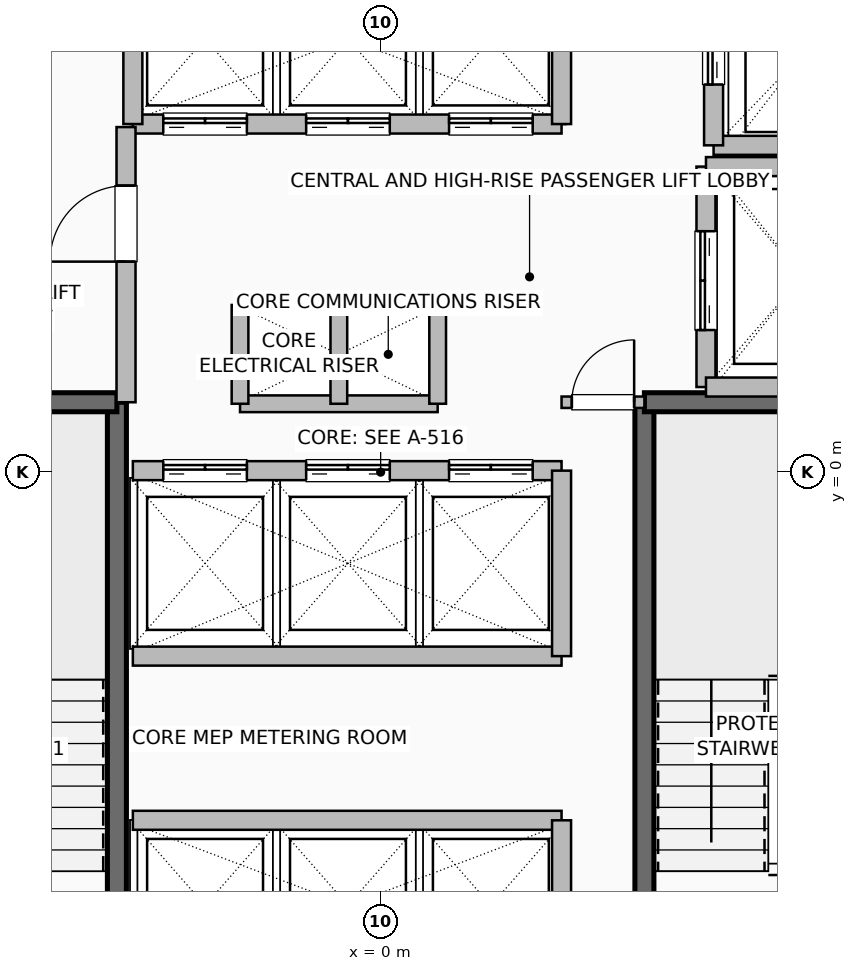
"""IFC4 building model, lengths in metres.
Left out: names, types, materials, properties, quantities, classifications, styles, units other than length and angle.
Written with IfcOpenShell. Run it as: python <this file> out.ifc"""

import sys

from ifc_helpers import new_model, si_unit, direction, frame, frame_2d, origin, place, context, subcontext, project, spatial, rectangle, extrude, element, fill, save


model = new_model("IFC4")
c1 = context("Model", 3, precision=1e-05, world=origin(), true_north=direction((0.0, 1.0)))
c2 = subcontext(c1, "Body", "Model", "MODEL_VIEW")
j1 = project(units=[si_unit("LENGTHUNIT", "METRE"), si_unit("PLANEANGLEUNIT", "RADIAN")], contexts=[c1])
p1 = place(None, origin())
s1 = spatial("IfcSite", under=j1, at=p1, CompositionType="ELEMENT")
p2 = place(p1, origin())
s2 = spatial("IfcBuilding", under=s1, at=p2, CompositionType="ELEMENT")
p3 = place(p2, frame((0.0, 0.0, 58.5)))
s3 = spatial("IfcBuildingStorey", under=s2, at=p3, CompositionType="ELEMENT", Elevation=58.5)
p4 = place(p3, frame((-3.47, -6.8, 0.0), z_axis=(0.0, 0.0, 1.0), x_axis=(0.0, 1.0, 0.0)))
e1 = element("IfcWall", 1, at=p4, inside=s3, PredefinedType="SHEAR", context=c2, shape_type="SweptSolid", body=[
    extrude(rectangle(XDim=7.72, YDim=0.25, at=frame_2d((3.86, 0.0))), origin(), (0.0, 0.0, 1.0), 3.25),
])
p5 = place(p3, frame((-6.8, 0.92, 0.0), z_axis=(0.0, 0.0, 1.0), x_axis=(1.0, 0.0, 0.0)))
e2 = element("IfcWall", 2, at=p5, inside=s3, PredefinedType="SHEAR", context=c2, shape_type="SweptSolid", body=[
    extrude(rectangle(XDim=3.33, YDim=0.25, at=frame_2d((1.665, 0.0))), origin(), (0.0, 0.0, 1.0), 3.25),
])
p6 = place(p3, frame((3.47, -6.8, 0.0), z_axis=(0.0, 0.0, 1.0), x_axis=(0.0, 1.0, 0.0)))
e3 = element("IfcWall", 3, at=p6, inside=s3, PredefinedType="SHEAR", context=c2, shape_type="SweptSolid", body=[
    extrude(rectangle(XDim=7.72, YDim=0.25, at=frame_2d((3.86, 0.0))), origin(), (0.0, 0.0, 1.0), 3.25),
])
p7 = place(p3, frame((3.47, 0.92, 0.0), z_axis=(0.0, 0.0, 1.0), x_axis=(1.0, 0.0, 0.0)))
e4 = element("IfcWall", 4, at=p7, inside=s3, PredefinedType="SHEAR", context=c2, shape_type="SweptSolid", body=[
    extrude(rectangle(XDim=3.33, YDim=0.25, at=frame_2d((1.665, 0.0))), origin(), (0.0, 0.0, 1.0), 3.25),
])
for number, where, z_axis, x_axis in (
    (5, (-1.85, 2.2, 0.0), (0.0, 0.0, 1.0), (1.0, 0.0, 0.0)),
    (6, (-1.85, 0.9, 0.0), (0.0, 0.0, 1.0), (1.0, 0.0, 0.0)),
):
    element("IfcWall", number, at=place(p3, frame(where, z_axis=z_axis, x_axis=x_axis)), inside=s3, PredefinedType="PARTITIONING", context=c2, shape_type="SweptSolid", body=[
        extrude(rectangle(XDim=2.6, YDim=0.22, at=frame_2d((1.3, 0.0))), origin(), (0.0, 0.0, 1.0), 3.25),
    ])
for number, where, z_axis, x_axis in (
    (7, (-0.55, 0.9, 0.0), (0.0, 0.0, 1.0), (0.0, 1.0, 0.0)),
    (8, (0.75, 0.9, 0.0), (0.0, 0.0, 1.0), (0.0, 1.0, 0.0)),
    (9, (-1.85, 0.9, 0.0), (0.0, 0.0, 1.0), (0.0, 1.0, 0.0)),
):
    element("IfcWall", number, at=place(p3, frame(where, z_axis=z_axis, x_axis=x_axis)), inside=s3, PredefinedType="PARTITIONING", context=c2, shape_type="SweptSolid", body=[
        extrude(rectangle(XDim=1.3, YDim=0.22, at=frame_2d((0.65, 0.0))), origin(), (0.0, 0.0, 1.0), 3.25),
    ])
p8 = place(p3, frame((-3.26, -4.58, 0.0), z_axis=(0.0, 0.0, 1.0), x_axis=(1.0, 0.0, 0.0)))
e10 = element("IfcWall", 10, at=p8, inside=s3, PredefinedType="SHEAR", context=c2, shape_type="SweptSolid", body=[
    extrude(rectangle(XDim=5.64, YDim=0.25, at=frame_2d((2.82, 0.0))), origin(), (0.0, 0.0, 1.0), 3.25),
])
p9 = place(p3, frame((2.38, -6.8, 0.0), z_axis=(0.0, 0.0, 1.0), x_axis=(0.0, 1.0, 0.0)))
e11 = element("IfcWall", 11, at=p9, inside=s3, PredefinedType="SHEAR", context=c2, shape_type="SweptSolid", body=[
    extrude(rectangle(XDim=2.22, YDim=0.25, at=frame_2d((1.11, 0.0))), origin(), (0.0, 0.0, 1.0), 3.25),
])
p10 = place(p3, frame((-3.26, 0.02, 0.0), z_axis=(0.0, 0.0, 1.0), x_axis=(1.0, 0.0, 0.0)))
e12 = element("IfcWall", 12, at=p10, inside=s3, PredefinedType="SHEAR", context=c2, shape_type="SweptSolid", body=[
    extrude(rectangle(XDim=5.64, YDim=0.25, at=frame_2d((2.82, 0.0))), origin(), (0.0, 0.0, 1.0), 3.25),
])
p11 = place(p10, frame((0.4, 0.0, 0.0)))
e13 = element("IfcOpeningElement", 13, at=p11, cuts=e12, PredefinedType="OPENING", context=c2, shape_type="SweptSolid", body=[
    extrude(rectangle(XDim=1.1, YDim=2.2, at=frame_2d((0.55, 1.1))), frame((0.0, 0.135, 0.0), z_axis=(0.0, -1.0, 0.0), x_axis=(1.0, 0.0, 0.0)), (0.0, 0.0, 1.0), 0.27),
])
p12 = place(p10, frame((2.28, 0.0, 0.0)))
e14 = element("IfcOpeningElement", 14, at=p12, cuts=e12, PredefinedType="OPENING", context=c2, shape_type="SweptSolid", body=[
    extrude(rectangle(XDim=1.1, YDim=2.2, at=frame_2d((0.55, 1.1))), frame((0.0, 0.135, 0.0), z_axis=(0.0, -1.0, 0.0), x_axis=(1.0, 0.0, 0.0)), (0.0, 0.0, 1.0), 0.27),
])
p13 = place(p10, frame((4.16, 0.0, 0.0)))
e15 = element("IfcOpeningElement", 15, at=p13, cuts=e12, PredefinedType="OPENING", context=c2, shape_type="SweptSolid", body=[
    extrude(rectangle(XDim=1.1, YDim=2.2, at=frame_2d((0.55, 1.1))), frame((0.0, 0.135, 0.0), z_axis=(0.0, -1.0, 0.0), x_axis=(1.0, 0.0, 0.0)), (0.0, 0.0, 1.0), 0.27),
])
p14 = place(p3, frame((-3.26, -2.42, 0.0), z_axis=(0.0, 0.0, 1.0), x_axis=(1.0, 0.0, 0.0)))
e16 = element("IfcWall", 16, at=p14, inside=s3, PredefinedType="SHEAR", context=c2, shape_type="SweptSolid", body=[
    extrude(rectangle(XDim=5.64, YDim=0.25, at=frame_2d((2.82, 0.0))), origin(), (0.0, 0.0, 1.0), 3.25),
])
p15 = place(p3, frame((2.38, -2.42, 0.0), z_axis=(0.0, 0.0, 1.0), x_axis=(0.0, 1.0, 0.0)))
e17 = element("IfcWall", 17, at=p15, inside=s3, PredefinedType="SHEAR", context=c2, shape_type="SweptSolid", body=[
    extrude(rectangle(XDim=2.44, YDim=0.25, at=frame_2d((1.22, 0.0))), origin(), (0.0, 0.0, 1.0), 3.25),
])
p16 = place(p3, frame((-3.26, 4.58, 0.0), z_axis=(0.0, 0.0, 1.0), x_axis=(1.0, 0.0, 0.0)))
e18 = element("IfcWall", 18, at=p16, inside=s3, PredefinedType="SHEAR", context=c2, shape_type="SweptSolid", body=[
    extrude(rectangle(XDim=5.64, YDim=0.25, at=frame_2d((2.82, 0.0))), origin(), (0.0, 0.0, 1.0), 3.25),
])
p17 = place(p16, frame((0.4, 0.0, 0.0)))
e19 = element("IfcOpeningElement", 19, at=p17, cuts=e18, PredefinedType="OPENING", context=c2, shape_type="SweptSolid", body=[
    extrude(rectangle(XDim=1.1, YDim=2.2, at=frame_2d((0.55, 1.1))), frame((0.0, 0.135, 0.0), z_axis=(0.0, -1.0, 0.0), x_axis=(1.0, 0.0, 0.0)), (0.0, 0.0, 1.0), 0.27),
])
p18 = place(p16, frame((2.28, 0.0, 0.0)))
e20 = element("IfcOpeningElement", 20, at=p18, cuts=e18, PredefinedType="OPENING", context=c2, shape_type="SweptSolid", body=[
    extrude(rectangle(XDim=1.1, YDim=2.2, at=frame_2d((0.55, 1.1))), frame((0.0, 0.135, 0.0), z_axis=(0.0, -1.0, 0.0), x_axis=(1.0, 0.0, 0.0)), (0.0, 0.0, 1.0), 0.27),
])
p19 = place(p16, frame((4.16, 0.0, 0.0)))
e21 = element("IfcOpeningElement", 21, at=p19, cuts=e18, PredefinedType="OPENING", context=c2, shape_type="SweptSolid", body=[
    extrude(rectangle(XDim=1.1, YDim=2.2, at=frame_2d((0.55, 1.1))), frame((0.0, 0.135, 0.0), z_axis=(0.0, -1.0, 0.0), x_axis=(1.0, 0.0, 0.0)), (0.0, 0.0, 1.0), 0.27),
])
for number, where, z_axis, x_axis in (
    (22, (-3.26, 4.58, 0.0), (0.0, 0.0, 1.0), (0.0, 1.0, 0.0)),
    (23, (2.38, 4.58, 0.0), (0.0, 0.0, 1.0), (0.0, 1.0, 0.0)),
):
    element("IfcWall", number, at=place(p3, frame(where, z_axis=z_axis, x_axis=x_axis)), inside=s3, PredefinedType="SHEAR", context=c2, shape_type="SweptSolid", body=[
        extrude(rectangle(XDim=2.22, YDim=0.25, at=frame_2d((1.11, 0.0))), origin(), (0.0, 0.0, 1.0), 3.25),
    ])
p20 = place(p3, frame((4.38, 4.3, 0.0), z_axis=(0.0, 0.0, 1.0), x_axis=(1.0, 0.0, 0.0)))
e24 = element("IfcWall", 24, at=p20, inside=s3, PredefinedType="SHEAR", context=c2, shape_type="SweptSolid", body=[
    extrude(rectangle(XDim=2.42, YDim=0.25, at=frame_2d((1.21, 0.0))), origin(), (0.0, 0.0, 1.0), 3.25),
])
p21 = place(p3, frame((4.38, 4.3, 0.0), z_axis=(0.0, 0.0, 1.0), x_axis=(0.0, 1.0, 0.0)))
e25 = element("IfcWall", 25, at=p21, inside=s3, PredefinedType="SHEAR", context=c2, shape_type="SweptSolid", body=[
    extrude(rectangle(XDim=2.5, YDim=0.25, at=frame_2d((1.25, 0.0))), origin(), (0.0, 0.0, 1.0), 3.25),
])
p22 = place(p21, frame((0.8, 0.0, 0.0)))
e26 = element("IfcOpeningElement", 26, at=p22, cuts=e25, PredefinedType="OPENING", context=c2, shape_type="SweptSolid", body=[
    extrude(rectangle(XDim=1.2, YDim=2.2, at=frame_2d((0.6, 1.1))), frame((0.0, 0.135, 0.0), z_axis=(0.0, -1.0, 0.0), x_axis=(1.0, 0.0, 0.0)), (0.0, 0.0, 1.0), 0.27),
])
p23 = place(p3, frame((4.28, 1.12, 0.0), z_axis=(0.0, 0.0, 1.0), x_axis=(0.0, 1.0, 0.0)))
e27 = element("IfcWall", 27, at=p23, inside=s3, PredefinedType="SHEAR", context=c2, shape_type="SweptSolid", body=[
    extrude(rectangle(XDim=2.9, YDim=0.25, at=frame_2d((1.45, 0.0))), origin(), (0.0, 0.0, 1.0), 3.25),
])
p24 = place(p23, frame((0.75, 0.0, 0.0)))
e28 = element("IfcOpeningElement", 28, at=p24, cuts=e27, PredefinedType="OPENING", context=c2, shape_type="SweptSolid", body=[
    extrude(rectangle(XDim=1.3, YDim=2.3, at=frame_2d((0.65, 1.15))), frame((0.0, 0.135, 0.0), z_axis=(0.0, -1.0, 0.0), x_axis=(1.0, 0.0, 0.0)), (0.0, 0.0, 1.0), 0.27),
])
for number, where, z_axis, x_axis in (
    (29, (4.28, 1.12, 0.0), (0.0, 0.0, 1.0), (1.0, 0.0, 0.0)),
    (30, (4.28, 4.02, 0.0), (0.0, 0.0, 1.0), (1.0, 0.0, 0.0)),
):
    element("IfcWall", number, at=place(p3, frame(where, z_axis=z_axis, x_axis=x_axis)), inside=s3, PredefinedType="SHEAR", context=c2, shape_type="SweptSolid", body=[
        extrude(rectangle(XDim=2.52, YDim=0.25, at=frame_2d((1.26, 0.0))), origin(), (0.0, 0.0, 1.0), 3.25),
    ])
p25 = place(p3, frame((-3.35, 0.92, 0.0), z_axis=(0.0, 0.0, 1.0), x_axis=(0.0, 1.0, 0.0)))
e31 = element("IfcWall", 31, at=p25, inside=s3, PredefinedType="SHEAR", context=c2, shape_type="SweptSolid", body=[
    extrude(rectangle(XDim=3.62, YDim=0.25, at=frame_2d((1.81, 0.0))), origin(), (0.0, 0.0, 1.0), 3.25),
])
p26 = place(p25, frame((1.85, 0.0, 0.0)))
e32 = element("IfcOpeningElement", 32, at=p26, cuts=e31, PredefinedType="OPENING", context=c2, shape_type="SweptSolid", body=[
    extrude(rectangle(XDim=1.0, YDim=2.08, at=frame_2d((0.5, 1.04))), frame((0.0, 0.135, 0.0), z_axis=(0.0, -1.0, 0.0), x_axis=(1.0, 0.0, 0.0)), (0.0, 0.0, 1.0), 0.27),
])
p27 = place(p3, frame((2.38, 0.92, 0.0), z_axis=(0.0, 0.0, 1.0), x_axis=(1.0, 0.0, 0.0)))
e33 = element("IfcWall", 33, at=p27, inside=s3, PredefinedType="PARTITIONING", context=c2, shape_type="SweptSolid", body=[
    extrude(rectangle(XDim=1.09, YDim=0.15, at=frame_2d((0.545, 0.0))), origin(), (0.0, 0.0, 1.0), 3.25),
])
p28 = place(p27, frame((0.135, 0.0, 0.0)))
e34 = element("IfcOpeningElement", 34, at=p28, cuts=e33, PredefinedType="OPENING", context=c2, shape_type="SweptSolid", body=[
    extrude(rectangle(XDim=0.82, YDim=2.05, at=frame_2d((0.41, 1.025))), frame((0.0, 0.085, 0.0), z_axis=(0.0, -1.0, 0.0), x_axis=(1.0, 0.0, 0.0)), (0.0, 0.0, 1.0), 0.17),
])
p29 = place(p11, origin())
e35 = element("IfcDoor", 35, at=p29, inside=s3, OperationType="DOUBLE_DOOR_SLIDING", PredefinedType="DOOR", context=c2, shape_type="SweptSolid", body=[
    extrude(rectangle(XDim=1.1, YDim=2.2, at=frame_2d((0.55, 1.1))), frame((0.0, 0.025, 0.0), z_axis=(0.0, -1.0, 0.0), x_axis=(1.0, 0.0, 0.0)), (0.0, 0.0, 1.0), 0.05),
])
fill(e13, e35)
p30 = place(p12, origin())
e36 = element("IfcDoor", 36, at=p30, inside=s3, OperationType="DOUBLE_DOOR_SLIDING", PredefinedType="DOOR", context=c2, shape_type="SweptSolid", body=[
    extrude(rectangle(XDim=1.1, YDim=2.2, at=frame_2d((0.55, 1.1))), frame((0.0, 0.025, 0.0), z_axis=(0.0, -1.0, 0.0), x_axis=(1.0, 0.0, 0.0)), (0.0, 0.0, 1.0), 0.05),
])
fill(e14, e36)
p31 = place(p13, origin())
e37 = element("IfcDoor", 37, at=p31, inside=s3, OperationType="DOUBLE_DOOR_SLIDING", PredefinedType="DOOR", context=c2, shape_type="SweptSolid", body=[
    extrude(rectangle(XDim=1.1, YDim=2.2, at=frame_2d((0.55, 1.1))), frame((0.0, 0.025, 0.0), z_axis=(0.0, -1.0, 0.0), x_axis=(1.0, 0.0, 0.0)), (0.0, 0.0, 1.0), 0.05),
])
fill(e15, e37)
p32 = place(p17, origin())
e38 = element("IfcDoor", 38, at=p32, inside=s3, OperationType="DOUBLE_DOOR_SLIDING", PredefinedType="DOOR", context=c2, shape_type="SweptSolid", body=[
    extrude(rectangle(XDim=1.1, YDim=2.2, at=frame_2d((0.55, 1.1))), frame((0.0, 0.025, 0.0), z_axis=(0.0, -1.0, 0.0), x_axis=(1.0, 0.0, 0.0)), (0.0, 0.0, 1.0), 0.05),
])
fill(e19, e38)
p33 = place(p18, origin())
e39 = element("IfcDoor", 39, at=p33, inside=s3, OperationType="DOUBLE_DOOR_SLIDING", PredefinedType="DOOR", context=c2, shape_type="SweptSolid", body=[
    extrude(rectangle(XDim=1.1, YDim=2.2, at=frame_2d((0.55, 1.1))), frame((0.0, 0.025, 0.0), z_axis=(0.0, -1.0, 0.0), x_axis=(1.0, 0.0, 0.0)), (0.0, 0.0, 1.0), 0.05),
])
fill(e20, e39)
p34 = place(p19, origin())
e40 = element("IfcDoor", 40, at=p34, inside=s3, OperationType="DOUBLE_DOOR_SLIDING", PredefinedType="DOOR", context=c2, shape_type="SweptSolid", body=[
    extrude(rectangle(XDim=1.1, YDim=2.2, at=frame_2d((0.55, 1.1))), frame((0.0, 0.025, 0.0), z_axis=(0.0, -1.0, 0.0), x_axis=(1.0, 0.0, 0.0)), (0.0, 0.0, 1.0), 0.05),
])
fill(e21, e40)
p35 = place(p22, origin())
e41 = element("IfcDoor", 41, at=p35, inside=s3, OperationType="DOUBLE_DOOR_SLIDING", PredefinedType="DOOR", context=c2, shape_type="SweptSolid", body=[
    extrude(rectangle(XDim=1.2, YDim=2.2, at=frame_2d((0.6, 1.1))), frame((0.0, 0.025, 0.0), z_axis=(0.0, -1.0, 0.0), x_axis=(1.0, 0.0, 0.0)), (0.0, 0.0, 1.0), 0.05),
])
fill(e26, e41)
p36 = place(p24, origin())
e42 = element("IfcDoor", 42, at=p36, inside=s3, OperationType="DOUBLE_DOOR_SLIDING", PredefinedType="DOOR", context=c2, shape_type="SweptSolid", body=[
    extrude(rectangle(XDim=1.3, YDim=2.3, at=frame_2d((0.65, 1.15))), frame((0.0, 0.025, 0.0), z_axis=(0.0, -1.0, 0.0), x_axis=(1.0, 0.0, 0.0)), (0.0, 0.0, 1.0), 0.05),
])
fill(e28, e42)
p37 = place(p26, origin())
e43 = element("IfcDoor", 43, at=p37, inside=s3, OperationType="SINGLE_SWING_LEFT", PredefinedType="DOOR", context=c2, shape_type="SweptSolid", body=[
    extrude(rectangle(XDim=1.0, YDim=2.08, at=frame_2d((0.5, 1.04))), frame((0.0, 0.025, 0.0), z_axis=(0.0, -1.0, 0.0), x_axis=(1.0, 0.0, 0.0)), (0.0, 0.0, 1.0), 0.05),
])
fill(e32, e43)
p38 = place(p28, origin())
e44 = element("IfcDoor", 44, at=p38, inside=s3, OperationType="SINGLE_SWING_RIGHT", PredefinedType="DOOR", context=c2, shape_type="SweptSolid", body=[
    extrude(rectangle(XDim=0.82, YDim=2.05, at=frame_2d((0.41, 1.025))), frame((0.0, 0.025, 0.0), z_axis=(0.0, -1.0, 0.0), x_axis=(1.0, 0.0, 0.0)), (0.0, 0.0, 1.0), 0.05),
])
fill(e34, e44)
save(model, sys.argv[1])
